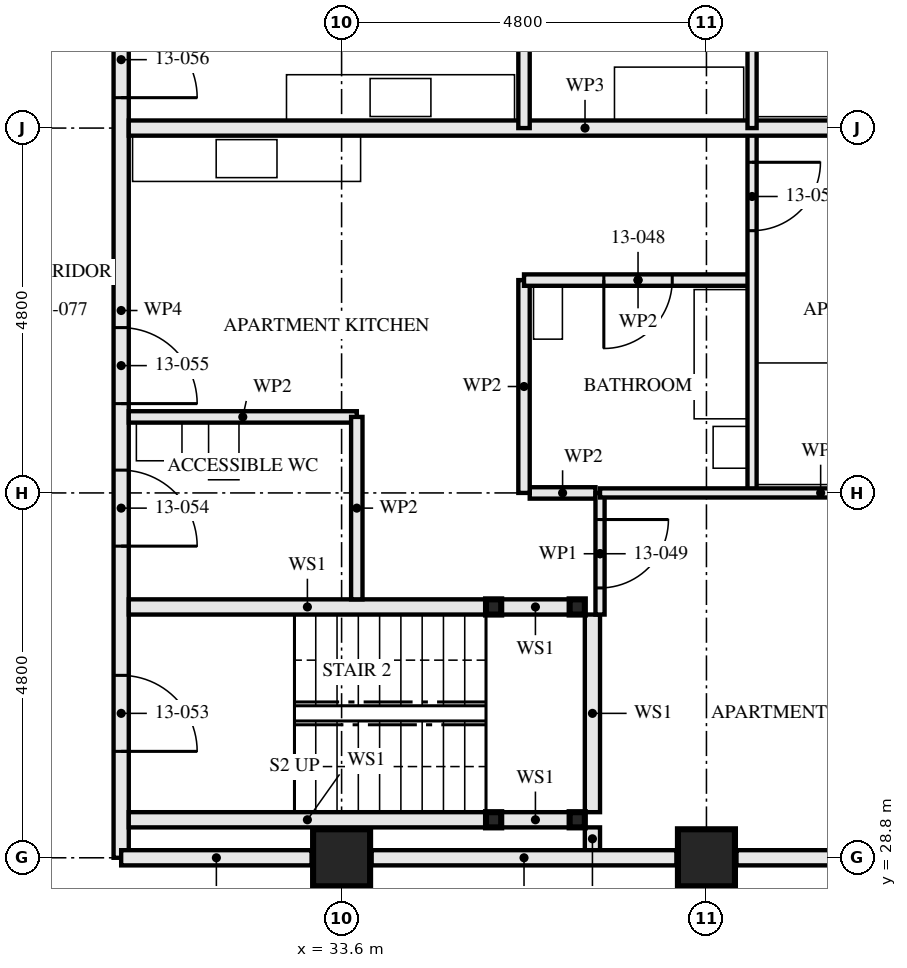
"""IFC4 building model, lengths in metres.
Left out: names, types, materials, properties, quantities, classifications, styles, units other than length and angle.
Written with IfcOpenShell. Run it as: python <this file> out.ifc"""

import sys

from ifc_helpers import new_model, si_unit, direction, frame, frame_2d, origin, origin_2d, place, context, subcontext, project, spatial, rectangle, hollow_rectangle, extrude, element, fill, save


model = new_model("IFC4")
c1 = context("Model", 3, precision=1e-05, world=origin(), true_north=direction((0.0, 1.0)))
c2 = subcontext(c1, "Body", "Model", "MODEL_VIEW")
j1 = project(units=[si_unit("LENGTHUNIT", "METRE"), si_unit("PLANEANGLEUNIT", "RADIAN")], contexts=[c1])
p1 = place(None, origin())
s1 = spatial("IfcSite", under=j1, at=p1, CompositionType="ELEMENT")
p2 = place(p1, origin())
s2 = spatial("IfcBuilding", under=s1, at=p2, CompositionType="ELEMENT")
p3 = place(p2, frame((0.0, 0.0, 51.5)))
s3 = spatial("IfcBuildingStorey", under=s2, at=p3, CompositionType="ELEMENT", Elevation=51.5)
for number, where, z_axis, x_axis in (
    (1, (33.6, 28.8, 0.0), (0.0, 0.0, 1.0), (0.0, 1.0, 0.0)),
    (2, (38.4, 28.8, 0.0), (0.0, 0.0, 1.0), (0.0, 1.0, 0.0)),
):
    element("IfcColumn", number, at=place(p3, frame(where, z_axis=z_axis, x_axis=x_axis)), inside=s3, PredefinedType="COLUMN", context=c2, shape_type="SweptSolid", body=[
        extrude(hollow_rectangle(XDim=0.75, YDim=0.75, WallThickness=0.08, at=origin_2d()), origin(), (0.0, 0.0, 1.0), 3.5),
    ])
for number, where, z_axis, x_axis in (
    (3, (36.7, 29.3, 0.0), (0.0, 0.0, 1.0), (1.0, 0.0, 0.0)),
    (4, (36.7, 32.1, 0.0), (0.0, 0.0, 1.0), (1.0, 0.0, 0.0)),
    (5, (35.6, 29.3, 0.0), (0.0, 0.0, 1.0), (1.0, 0.0, 0.0)),
    (6, (35.6, 32.1, 0.0), (0.0, 0.0, 1.0), (1.0, 0.0, 0.0)),
):
    element("IfcColumn", number, at=place(p3, frame(where, z_axis=z_axis, x_axis=x_axis)), inside=s3, PredefinedType="COLUMN", context=c2, shape_type="SweptSolid", body=[
        extrude(hollow_rectangle(XDim=0.2, YDim=0.2, WallThickness=0.008, at=origin_2d()), origin(), (0.0, 0.0, 1.0), 3.33),
    ])
p4 = place(p3, frame((38.4, 26.8, 0.0), z_axis=(0.0, 0.0, 1.0), x_axis=(0.0, 1.0, 0.0)))
e7 = element("IfcWall", 7, at=p4, inside=s3, PredefinedType="PARTITIONING", context=c2, shape_type="SweptSolid", body=[
    extrude(rectangle(XDim=1.605, YDim=0.2, at=frame_2d((0.802, 0.0))), origin(), (0.0, 0.0, 1.0), 3.33),
])
p5 = place(p3, frame((36.6, 29.3, 0.0), z_axis=(0.0, 0.0, 1.0), x_axis=(-1.0, 0.0, 0.0)))
e8 = element("IfcWall", 8, at=p5, inside=s3, PredefinedType="SOLIDWALL", context=c2, shape_type="SweptSolid", body=[
    extrude(rectangle(XDim=0.9, YDim=0.2, at=frame_2d((0.45, 0.0))), origin(), (0.0, 0.0, 1.0), 2.99),
])
p6 = place(p3, frame((35.5, 29.3, 0.0), z_axis=(0.0, 0.0, 1.0), x_axis=(-1.0, 0.0, 0.0)))
e9 = element("IfcWall", 9, at=p6, inside=s3, PredefinedType="SOLIDWALL", context=c2, shape_type="SweptSolid", body=[
    extrude(rectangle(XDim=4.7, YDim=0.2, at=frame_2d((2.35, 0.0))), origin(), (0.0, 0.0, 1.0), 2.99),
])
p7 = place(p3, frame((36.6, 32.1, 0.0), z_axis=(0.0, 0.0, 1.0), x_axis=(-1.0, 0.0, 0.0)))
e10 = element("IfcWall", 10, at=p7, inside=s3, PredefinedType="SOLIDWALL", context=c2, shape_type="SweptSolid", body=[
    extrude(rectangle(XDim=0.9, YDim=0.2, at=frame_2d((0.45, 0.0))), origin(), (0.0, 0.0, 1.0), 2.99),
])
p8 = place(p3, frame((35.5, 32.1, 0.0), z_axis=(0.0, 0.0, 1.0), x_axis=(-1.0, 0.0, 0.0)))
e11 = element("IfcWall", 11, at=p8, inside=s3, PredefinedType="SOLIDWALL", context=c2, shape_type="SweptSolid", body=[
    extrude(rectangle(XDim=4.7, YDim=0.2, at=frame_2d((2.35, 0.0))), origin(), (0.0, 0.0, 1.0), 2.99),
])
p9 = place(p3, frame((36.9, 28.9, 0.0), z_axis=(0.0, 0.0, 1.0), x_axis=(0.0, 1.0, 0.0)))
e12 = element("IfcWall", 12, at=p9, inside=s3, PredefinedType="SOLIDWALL", context=c2, shape_type="SweptSolid", body=[
    extrude(rectangle(XDim=0.3, YDim=0.2, at=frame_2d((0.15, 0.0))), origin(), (0.0, 0.0, 1.0), 3.33),
])
p10 = place(p3, frame((36.9, 29.4, 0.0), z_axis=(0.0, 0.0, 1.0), x_axis=(0.0, 1.0, 0.0)))
e13 = element("IfcWall", 13, at=p10, inside=s3, PredefinedType="SOLIDWALL", context=c2, shape_type="SweptSolid", body=[
    extrude(rectangle(XDim=2.6, YDim=0.2, at=frame_2d((1.3, 0.0))), origin(), (0.0, 0.0, 1.0), 3.33),
])
p11 = place(p3, frame((33.8, 32.2, 0.0), z_axis=(0.0, 0.0, 1.0), x_axis=(0.0, 1.0, 0.0)))
e14 = element("IfcWall", 14, at=p11, inside=s3, PredefinedType="PARTITIONING", context=c2, shape_type="SweptSolid", body=[
    extrude(rectangle(XDim=2.4, YDim=0.15, at=frame_2d((1.2, 0.0))), origin(), (0.0, 0.0, 1.0), 2.55),
])
p12 = place(p3, frame((33.8, 34.6, 0.0), z_axis=(0.0, 0.0, 1.0), x_axis=(-1.0, 0.0, 0.0)))
e15 = element("IfcWall", 15, at=p12, inside=s3, PredefinedType="PARTITIONING", context=c2, shape_type="SweptSolid", body=[
    extrude(rectangle(XDim=3.0, YDim=0.15, at=frame_2d((1.5, 0.0))), origin(), (0.0, 0.0, 1.0), 3.33),
])
p13 = place(p3, frame((39.0, 36.4, 0.0), z_axis=(0.0, 0.0, 1.0), x_axis=(-1.0, 0.0, 0.0)))
e16 = element("IfcWall", 16, at=p13, inside=s3, PredefinedType="PARTITIONING", context=c2, shape_type="SweptSolid", body=[
    extrude(rectangle(XDim=3.0, YDim=0.15, at=frame_2d((1.5, 0.0))), origin(), (0.0, 0.0, 1.0), 3.33),
])
p14 = place(p13, frame((1.05, 0.0, 0.0)))
e17 = element("IfcOpeningElement", 17, at=p14, cuts=e16, PredefinedType="OPENING", context=c2, shape_type="SweptSolid", body=[
    extrude(rectangle(XDim=0.9, YDim=2.1, at=frame_2d((0.45, 1.05))), frame((0.0, 0.085, 0.0), z_axis=(0.0, -1.0, 0.0), x_axis=(1.0, 0.0, 0.0)), (0.0, 0.0, 1.0), 0.171),
])
p15 = place(p3, frame((36.0, 33.6, 0.0), z_axis=(0.0, 0.0, 1.0), x_axis=(0.0, 1.0, 0.0)))
e18 = element("IfcWall", 18, at=p15, inside=s3, PredefinedType="PARTITIONING", context=c2, shape_type="SweptSolid", body=[
    extrude(rectangle(XDim=2.8, YDim=0.15, at=frame_2d((1.4, 0.0))), origin(), (0.0, 0.0, 1.0), 3.33),
])
p16 = place(p3, frame((37.0, 32.0, 0.0), z_axis=(0.0, 0.0, 1.0), x_axis=(0.0, 1.0, 0.0)))
e19 = element("IfcWall", 19, at=p16, inside=s3, PredefinedType="PARTITIONING", context=c2, shape_type="SweptSolid", body=[
    extrude(rectangle(XDim=1.6, YDim=0.12, at=frame_2d((0.8, 0.0))), origin(), (0.0, 0.0, 1.0), 3.33),
])
p17 = place(p16, frame((0.35, 0.0, 0.0)))
e20 = element("IfcOpeningElement", 20, at=p17, cuts=e19, PredefinedType="OPENING", context=c2, shape_type="SweptSolid", body=[
    extrude(rectangle(XDim=0.9, YDim=2.1, at=frame_2d((0.45, 1.05))), frame((0.0, 0.071, 0.0), z_axis=(0.0, -1.0, 0.0), x_axis=(1.0, 0.0, 0.0)), (0.0, 0.0, 1.0), 0.141),
])
p18 = place(p3, frame((39.0, 33.6, 0.0), z_axis=(0.0, 0.0, 1.0), x_axis=(0.0, 1.0, 0.0)))
e21 = element("IfcWall", 21, at=p18, inside=s3, PredefinedType="PARTITIONING", context=c2, shape_type="SweptSolid", body=[
    extrude(rectangle(XDim=4.8, YDim=0.12, at=frame_2d((2.4, 0.0))), origin(), (0.0, 0.0, 1.0), 3.33),
])
p19 = place(p18, frame((3.45, 0.0, 0.0)))
e22 = element("IfcOpeningElement", 22, at=p19, cuts=e21, PredefinedType="OPENING", context=c2, shape_type="SweptSolid", body=[
    extrude(rectangle(XDim=0.9, YDim=2.1, at=frame_2d((0.45, 1.05))), frame((0.0, 0.071, 0.0), z_axis=(0.0, -1.0, 0.0), x_axis=(1.0, 0.0, 0.0)), (0.0, 0.0, 1.0), 0.141),
])
p20 = place(p3, frame((42.805, 33.6, 0.0), z_axis=(0.0, 0.0, 1.0), x_axis=(-1.0, 0.0, 0.0)))
e23 = element("IfcWall", 23, at=p20, inside=s3, PredefinedType="PARTITIONING", context=c2, shape_type="SweptSolid", body=[
    extrude(rectangle(XDim=5.805, YDim=0.12, at=frame_2d((2.902, 0.0))), origin(), (0.0, 0.0, 1.0), 2.55),
])
p21 = place(p3, frame((42.805, 38.4, 0.0), z_axis=(0.0, 0.0, 1.0), x_axis=(-1.0, 0.0, 0.0)))
e24 = element("IfcWall", 24, at=p21, inside=s3, PredefinedType="PARTITIONING", context=c2, shape_type="SweptSolid", body=[
    extrude(rectangle(XDim=12.005, YDim=0.2, at=frame_2d((6.002, 0.0))), origin(), (0.0, 0.0, 1.0), 2.55),
])
p22 = place(p3, frame((36.0, 38.4, 0.0), z_axis=(0.0, 0.0, 1.0), x_axis=(0.0, 1.0, 0.0)))
e25 = element("IfcWall", 25, at=p22, inside=s3, PredefinedType="PARTITIONING", context=c2, shape_type="SweptSolid", body=[
    extrude(rectangle(XDim=2.8, YDim=0.15, at=frame_2d((1.4, 0.0))), origin(), (0.0, 0.0, 1.0), 3.33),
])
p23 = place(p3, frame((39.0, 38.4, 0.0), z_axis=(0.0, 0.0, 1.0), x_axis=(0.0, 1.0, 0.0)))
e26 = element("IfcWall", 26, at=p23, inside=s3, PredefinedType="PARTITIONING", context=c2, shape_type="SweptSolid", body=[
    extrude(rectangle(XDim=4.8, YDim=0.12, at=frame_2d((2.4, 0.0))), origin(), (0.0, 0.0, 1.0), 3.33),
])
p24 = place(p23, frame((2.975, 0.0, 0.0)))
e27 = element("IfcOpeningElement", 27, at=p24, cuts=e26, PredefinedType="OPENING", context=c2, shape_type="SweptSolid", body=[
    extrude(rectangle(XDim=0.9, YDim=2.1, at=frame_2d((0.45, 1.05))), frame((0.0, 0.071, 0.0), z_axis=(0.0, -1.0, 0.0), x_axis=(1.0, 0.0, 0.0)), (0.0, 0.0, 1.0), 0.141),
])
p25 = place(p3, frame((30.7, 28.8, 0.0), z_axis=(0.0, 0.0, 1.0), x_axis=(0.0, 1.0, 0.0)))
e28 = element("IfcWall", 28, at=p25, inside=s3, PredefinedType="PARTITIONING", context=c2, shape_type="SweptSolid", body=[
    extrude(rectangle(XDim=14.4, YDim=0.2, at=frame_2d((7.2, 0.0))), origin(), (0.0, 0.0, 1.0), 2.55),
])
p26 = place(p25, frame((1.4, 0.0, 0.0)))
e29 = element("IfcOpeningElement", 29, at=p26, cuts=e28, PredefinedType="OPENING", context=c2, shape_type="SweptSolid", body=[
    extrude(rectangle(XDim=1.0, YDim=2.1, at=frame_2d((0.5, 1.05))), frame((0.0, 0.111, 0.0), z_axis=(0.0, -1.0, 0.0), x_axis=(1.0, 0.0, 0.0)), (0.0, 0.0, 1.0), 0.221),
])
p27 = place(p25, frame((4.1, 0.0, 0.0)))
e30 = element("IfcOpeningElement", 30, at=p27, cuts=e28, PredefinedType="OPENING", context=c2, shape_type="SweptSolid", body=[
    extrude(rectangle(XDim=1.0, YDim=2.1, at=frame_2d((0.5, 1.05))), frame((0.0, 0.111, 0.0), z_axis=(0.0, -1.0, 0.0), x_axis=(1.0, 0.0, 0.0)), (0.0, 0.0, 1.0), 0.221),
])
p28 = place(p25, frame((5.975, 0.0, 0.0)))
e31 = element("IfcOpeningElement", 31, at=p28, cuts=e28, PredefinedType="OPENING", context=c2, shape_type="SweptSolid", body=[
    extrude(rectangle(XDim=1.0, YDim=2.1, at=frame_2d((0.5, 1.05))), frame((0.0, 0.111, 0.0), z_axis=(0.0, -1.0, 0.0), x_axis=(1.0, 0.0, 0.0)), (0.0, 0.0, 1.0), 0.221),
])
p29 = place(p25, frame((10.0, 0.0, 0.0)))
e32 = element("IfcOpeningElement", 32, at=p29, cuts=e28, PredefinedType="OPENING", context=c2, shape_type="SweptSolid", body=[
    extrude(rectangle(XDim=1.0, YDim=2.1, at=frame_2d((0.5, 1.05))), frame((0.0, 0.111, 0.0), z_axis=(0.0, -1.0, 0.0), x_axis=(1.0, 0.0, 0.0)), (0.0, 0.0, 1.0), 0.221),
])
p30 = place(p3, frame((42.88, 28.8, 0.0), z_axis=(0.0, 0.0, 1.0), x_axis=(-1.0, 0.0, 0.0)))
e33 = element("IfcWall", 33, at=p30, inside=s3, PredefinedType="PARTITIONING", context=c2, shape_type="SweptSolid", body=[
    extrude(rectangle(XDim=4.085, YDim=0.2, at=frame_2d((2.042, 0.0))), origin(), (0.0, 0.0, 1.0), 2.32),
])
p31 = place(p3, frame((38.005, 28.8, 0.0), z_axis=(0.0, 0.0, 1.0), x_axis=(-1.0, 0.0, 0.0)))
e34 = element("IfcWall", 34, at=p31, inside=s3, PredefinedType="PARTITIONING", context=c2, shape_type="SweptSolid", body=[
    extrude(rectangle(XDim=4.01, YDim=0.2, at=frame_2d((2.005, 0.0))), origin(), (0.0, 0.0, 1.0), 2.32),
])
p32 = place(p3, frame((33.205, 28.8, 0.0), z_axis=(0.0, 0.0, 1.0), x_axis=(-1.0, 0.0, 0.0)))
e35 = element("IfcWall", 35, at=p32, inside=s3, PredefinedType="PARTITIONING", context=c2, shape_type="SweptSolid", body=[
    extrude(rectangle(XDim=2.505, YDim=0.2, at=frame_2d((1.252, 0.0))), origin(), (0.0, 0.0, 1.0), 2.32),
])
p33 = place(p3, frame((36.94, 33.6, 0.0), z_axis=(0.0, 0.0, 1.0), x_axis=(-1.0, 0.0, 0.0)))
e36 = element("IfcWall", 36, at=p33, inside=s3, PredefinedType="PARTITIONING", context=c2, shape_type="SweptSolid", body=[
    extrude(rectangle(XDim=0.865, YDim=0.15, at=frame_2d((0.433, 0.0))), origin(), (0.0, 0.0, 1.0), 2.55),
])
p34 = place(p14, origin())
e37 = element("IfcDoor", 37, at=p34, inside=s3, OperationType="SINGLE_SWING_LEFT", PredefinedType="DOOR", context=c2, shape_type="SweptSolid", body=[
    extrude(rectangle(XDim=0.9, YDim=2.1, at=frame_2d((0.45, 1.05))), frame((0.0, 0.022, 0.0), z_axis=(0.0, -1.0, 0.0), x_axis=(1.0, 0.0, 0.0)), (0.0, 0.0, 1.0), 0.044),
])
fill(e17, e37)
p35 = place(p17, frame((0.9, 0.0, 0.0), z_axis=(0.0, 0.0, 1.0), x_axis=(-1.0, 0.0, 0.0)))
e38 = element("IfcDoor", 38, at=p35, inside=s3, OperationType="SINGLE_SWING_RIGHT", PredefinedType="DOOR", context=c2, shape_type="SweptSolid", body=[
    extrude(rectangle(XDim=0.9, YDim=2.1, at=frame_2d((0.45, 1.05))), frame((0.0, 0.022, 0.0), z_axis=(0.0, -1.0, 0.0), x_axis=(1.0, 0.0, 0.0)), (0.0, 0.0, 1.0), 0.044),
])
fill(e20, e38)
p36 = place(p19, frame((0.9, 0.0, 0.0), z_axis=(0.0, 0.0, 1.0), x_axis=(-1.0, 0.0, 0.0)))
e39 = element("IfcDoor", 39, at=p36, inside=s3, OperationType="SINGLE_SWING_RIGHT", PredefinedType="DOOR", context=c2, shape_type="SweptSolid", body=[
    extrude(rectangle(XDim=0.9, YDim=2.1, at=frame_2d((0.45, 1.05))), frame((0.0, 0.022, 0.0), z_axis=(0.0, -1.0, 0.0), x_axis=(1.0, 0.0, 0.0)), (0.0, 0.0, 1.0), 0.044),
])
fill(e22, e39)
p37 = place(p26, frame((1.0, 0.0, 0.0), z_axis=(0.0, 0.0, 1.0), x_axis=(-1.0, 0.0, 0.0)))
e40 = element("IfcDoor", 40, at=p37, inside=s3, OperationType="SINGLE_SWING_LEFT", PredefinedType="DOOR", context=c2, shape_type="SweptSolid", body=[
    extrude(rectangle(XDim=1.0, YDim=2.1, at=frame_2d((0.5, 1.05))), frame((0.0, 0.032, 0.0), z_axis=(0.0, -1.0, 0.0), x_axis=(1.0, 0.0, 0.0)), (0.0, 0.0, 1.0), 0.064),
])
fill(e29, e40)
p38 = place(p27, frame((1.0, 0.0, 0.0), z_axis=(0.0, 0.0, 1.0), x_axis=(-1.0, 0.0, 0.0)))
e41 = element("IfcDoor", 41, at=p38, inside=s3, OperationType="SINGLE_SWING_LEFT", PredefinedType="DOOR", context=c2, shape_type="SweptSolid", body=[
    extrude(rectangle(XDim=1.0, YDim=2.1, at=frame_2d((0.5, 1.05))), frame((0.0, 0.027, 0.0), z_axis=(0.0, -1.0, 0.0), x_axis=(1.0, 0.0, 0.0)), (0.0, 0.0, 1.0), 0.054),
])
fill(e30, e41)
p39 = place(p28, frame((1.0, 0.0, 0.0), z_axis=(0.0, 0.0, 1.0), x_axis=(-1.0, 0.0, 0.0)))
e42 = element("IfcDoor", 42, at=p39, inside=s3, OperationType="SINGLE_SWING_LEFT", PredefinedType="DOOR", context=c2, shape_type="SweptSolid", body=[
    extrude(rectangle(XDim=1.0, YDim=2.1, at=frame_2d((0.5, 1.05))), frame((0.0, 0.027, 0.0), z_axis=(0.0, -1.0, 0.0), x_axis=(1.0, 0.0, 0.0)), (0.0, 0.0, 1.0), 0.054),
])
fill(e31, e42)
p40 = place(p29, frame((1.0, 0.0, 0.0), z_axis=(0.0, 0.0, 1.0), x_axis=(-1.0, 0.0, 0.0)))
e43 = element("IfcDoor", 43, at=p40, inside=s3, OperationType="SINGLE_SWING_LEFT", PredefinedType="DOOR", context=c2, shape_type="SweptSolid", body=[
    extrude(rectangle(XDim=1.0, YDim=2.1, at=frame_2d((0.5, 1.05))), frame((0.0, 0.027, 0.0), z_axis=(0.0, -1.0, 0.0), x_axis=(1.0, 0.0, 0.0)), (0.0, 0.0, 1.0), 0.054),
])
fill(e32, e43)
save(model, sys.argv[1])
